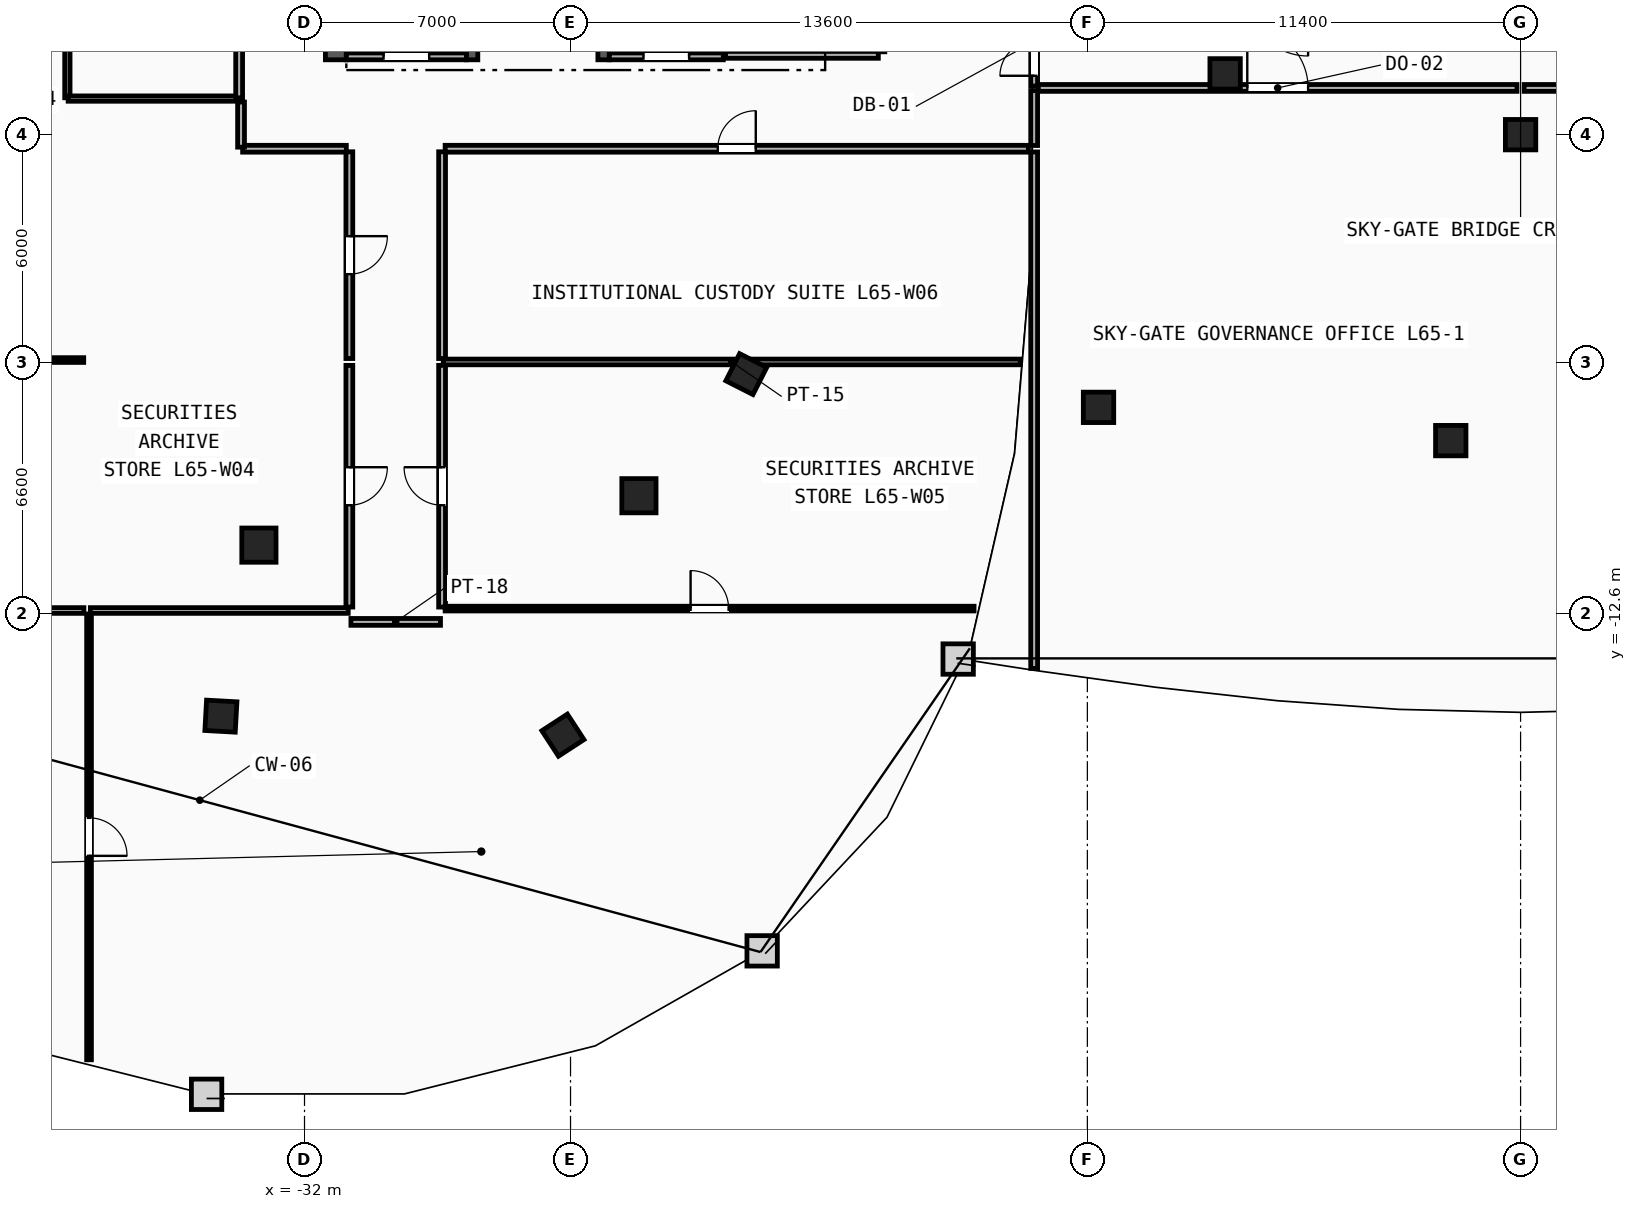
"""IFC4 building model, lengths in metres.
Left out: names, types, materials, properties, quantities, classifications, styles, units other than length and angle.
Written with IfcOpenShell. Run it as: python <this file> out.ifc"""

import sys

from ifc_helpers import new_model, si_unit, direction, frame, frame_2d, origin, origin_2d, place, context, subcontext, project, spatial, rectangle, extrude, element, fill, save


model = new_model("IFC4")
c1 = context("Model", 3, precision=1e-05, world=origin(), true_north=direction((0.0, 1.0)))
c2 = subcontext(c1, "Body", "Model", "MODEL_VIEW")
j1 = project(units=[si_unit("LENGTHUNIT", "METRE"), si_unit("PLANEANGLEUNIT", "RADIAN")], contexts=[c1])
p1 = place(None, origin())
s1 = spatial("IfcSite", under=j1, at=p1, CompositionType="ELEMENT")
p2 = place(p1, origin())
s2 = spatial("IfcBuilding", under=s1, at=p2, CompositionType="ELEMENT")
p3 = place(p2, frame((0.0, 0.0, 246.8)))
s3 = spatial("IfcBuildingStorey", under=s2, at=p3, CompositionType="ELEMENT", Elevation=246.8)
for number, where, z_axis, x_axis in (
    (1, (-33.2, -10.8, 0.0), (0.0, 0.0, 1.0), (1.0, 0.0, 0.0)),
    (2, (-23.2, -9.5, 0.0), (0.0, 0.0, 1.0), (1.0, 0.0, 0.0)),
):
    element("IfcColumn", number, at=place(p3, frame(where, z_axis=z_axis, x_axis=x_axis)), inside=s3, PredefinedType="COLUMN", context=c2, shape_type="SweptSolid", body=[
        extrude(rectangle(XDim=0.9, YDim=0.9, at=origin_2d()), origin(), (0.0, 0.0, 1.0), 3.6),
    ])
for number, where, z_axis, x_axis in (
    (3, (-34.2, -15.3, 0.0), (0.0, 0.0, 1.0), (0.998, -0.055, 0.0)),
    (4, (-25.2, -15.8, 0.0), (0.0, 0.0, 1.0), (0.838, 0.546, 0.0)),
    (5, (-20.375, -6.3, 0.0), (0.0, 0.0, 1.0), (0.453, 0.892, 0.0)),
    (6, (-11.106, -7.175, 0.0), (0.0, 0.0, 1.0), (1.0, 0.0, 0.0)),
    (7, (-1.837, -8.05, 0.0), (0.0, 0.0, 1.0), (1.0, 0.0, 0.0)),
    (8, (-7.775, 1.6, 0.0), (0.0, 0.0, 1.0), (1.0, 0.0, 0.0)),
    (9, (0.0, 0.0, 0.0), (0.0, 0.0, 1.0), (1.0, 0.0, 0.0)),
):
    element("IfcColumn", number, at=place(p3, frame(where, z_axis=z_axis, x_axis=x_axis)), inside=s3, PredefinedType="COLUMN", context=c2, shape_type="SweptSolid", body=[
        extrude(rectangle(XDim=0.8, YDim=0.8, at=origin_2d()), origin(), (0.0, 0.0, 1.0), 3.6),
    ])
p4 = place(p3, frame((-31.175, 1.97, 0.0), z_axis=(0.0, 0.0, 1.0), x_axis=(0.0, 1.0, 0.0)))
e10 = element("IfcWall", 10, at=p4, inside=s3, PredefinedType="SHEAR", context=c2, shape_type="SweptSolid", body=[
    extrude(rectangle(XDim=13.33, YDim=0.55, at=frame_2d((6.665, 0.0))), origin(), (0.0, 0.0, 1.0), 3.34),
])
for number, where, z_axis, x_axis in (
    (11, (-27.59, 1.97, 0.0), (0.0, 0.0, 1.0), (0.0, 1.0, 0.0)),
    (12, (-24.13, 1.97, 0.0), (0.0, 0.0, 1.0), (0.0, 1.0, 0.0)),
):
    element("IfcWall", number, at=place(p3, frame(where, z_axis=z_axis, x_axis=x_axis)), inside=s3, PredefinedType="SHEAR", context=c2, shape_type="SweptSolid", body=[
        extrude(rectangle(XDim=10.68, YDim=0.3, at=frame_2d((5.34, 0.0))), origin(), (0.0, 0.0, 1.0), 3.34),
    ])
p5 = place(p3, frame((-20.89, 2.15, 0.0), z_axis=(0.0, 0.0, 1.0), x_axis=(0.0, 1.0, 0.0)))
e13 = element("IfcWall", 13, at=p5, inside=s3, PredefinedType="PARTITIONING", context=c2, shape_type="SweptSolid", body=[
    extrude(rectangle(XDim=5.3, YDim=0.18, at=frame_2d((2.65, 0.0))), origin(), (0.0, 0.0, 1.0), 3.34),
])
p6 = place(p3, frame((-23.98, 2.06, 0.0), z_axis=(0.0, 0.0, 1.0), x_axis=(1.0, 0.0, 0.0)))
e14 = element("IfcWall", 14, at=p6, inside=s3, PredefinedType="PARTITIONING", context=c2, shape_type="SweptSolid", body=[
    extrude(rectangle(XDim=3.0, YDim=0.18, at=frame_2d((1.5, 0.0))), origin(), (0.0, 0.0, 1.0), 3.34),
])
p7 = place(p6, frame((0.9, 0.0, 0.0)))
e15 = element("IfcOpeningElement", 15, at=p7, cuts=e14, PredefinedType="OPENING", context=c2, shape_type="SweptSolid", body=[
    extrude(rectangle(XDim=1.2, YDim=2.15, at=frame_2d((0.6, 1.075))), frame((0.0, 0.1, 0.0), z_axis=(0.0, -1.0, 0.0), x_axis=(1.0, 0.0, 0.0)), (0.0, 0.0, 1.0), 0.2),
])
p8 = place(p3, frame((-30.9, 2.06, 0.0), z_axis=(0.0, 0.0, 1.0), x_axis=(1.0, 0.0, 0.0)))
e16 = element("IfcWall", 16, at=p8, inside=s3, PredefinedType="PARTITIONING", context=c2, shape_type="SweptSolid", body=[
    extrude(rectangle(XDim=3.16, YDim=0.18, at=frame_2d((1.58, 0.0))), origin(), (0.0, 0.0, 1.0), 3.34),
])
p9 = place(p8, frame((0.98, 0.0, 0.0)))
e17 = element("IfcOpeningElement", 17, at=p9, cuts=e16, PredefinedType="OPENING", context=c2, shape_type="SweptSolid", body=[
    extrude(rectangle(XDim=1.2, YDim=2.15, at=frame_2d((0.6, 1.075))), frame((0.0, 0.1, 0.0), z_axis=(0.0, -1.0, 0.0), x_axis=(1.0, 0.0, 0.0)), (0.0, 0.0, 1.0), 0.2),
])
p10 = place(p3, frame((-38.24, 0.97, 0.0), z_axis=(0.0, 0.0, 1.0), x_axis=(0.0, 1.0, 0.0)))
e18 = element("IfcWall", 18, at=p10, inside=s3, PredefinedType="PARTITIONING", context=c2, shape_type="SweptSolid", body=[
    extrude(rectangle(XDim=4.275, YDim=0.14, at=frame_2d((2.138, 0.0))), origin(), (0.0, 0.0, 1.0), 3.34),
])
p11 = place(p3, frame((-38.22, 0.95, 0.0), z_axis=(0.0, 0.0, 1.0), x_axis=(1.0, 0.0, 0.0)))
e19 = element("IfcWall", 19, at=p11, inside=s3, PredefinedType="PARTITIONING", context=c2, shape_type="SweptSolid", body=[
    extrude(rectangle(XDim=4.48, YDim=0.14, at=frame_2d((2.24, 0.0))), origin(), (0.0, 0.0, 1.0), 3.34),
])
p12 = place(p3, frame((-33.72, 0.97, 0.0), z_axis=(0.0, 0.0, 1.0), x_axis=(0.0, 1.0, 0.0)))
e20 = element("IfcWall", 20, at=p12, inside=s3, PredefinedType="PARTITIONING", context=c2, shape_type="SweptSolid", body=[
    extrude(rectangle(XDim=4.26, YDim=0.18, at=frame_2d((2.13, 0.0))), origin(), (0.0, 0.0, 1.0), 3.34),
])
p13 = place(p12, frame((1.655, 0.0, 0.0)))
e21 = element("IfcOpeningElement", 21, at=p13, cuts=e20, PredefinedType="OPENING", context=c2, shape_type="SweptSolid", body=[
    extrude(rectangle(XDim=0.95, YDim=2.1, at=frame_2d((0.475, 1.05))), frame((0.0, 0.1, 0.0), z_axis=(0.0, -1.0, 0.0), x_axis=(1.0, 0.0, 0.0)), (0.0, 0.0, 1.0), 0.2),
])
p14 = place(p3, frame((-28.35, -5.98, 0.0), z_axis=(0.0, 0.0, 1.0), x_axis=(1.0, 0.0, 0.0)))
e22 = element("IfcWall", 22, at=p14, inside=s3, PredefinedType="PARTITIONING", context=c2, shape_type="SweptSolid", body=[
    extrude(rectangle(XDim=15.185, YDim=0.15, at=frame_2d((7.593, 0.0))), origin(), (0.0, 0.0, 1.0), 3.34),
])
p15 = place(p3, frame((-49.686, -12.52, 0.0), z_axis=(0.0, 0.0, 1.0), x_axis=(1.0, 0.0, 0.0)))
e23 = element("IfcWall", 23, at=p15, inside=s3, PredefinedType="PARTITIONING", context=c2, shape_type="SweptSolid", body=[
    extrude(rectangle(XDim=11.881, YDim=0.15, at=frame_2d((5.94, 0.0))), origin(), (0.0, 0.0, 1.0), 3.34),
])
p16 = place(p3, frame((-37.635, -12.52, 0.0), z_axis=(0.0, 0.0, 1.0), x_axis=(1.0, 0.0, 0.0)))
e24 = element("IfcWall", 24, at=p16, inside=s3, PredefinedType="PARTITIONING", context=c2, shape_type="SweptSolid", body=[
    extrude(rectangle(XDim=6.785, YDim=0.15, at=frame_2d((3.393, 0.0))), origin(), (0.0, 0.0, 1.0), 3.34),
])
p17 = place(p3, frame((-30.779, -12.82, 0.0), z_axis=(0.0, 0.0, 1.0), x_axis=(1.0, 0.0, 0.0)))
e25 = element("IfcWall", 25, at=p17, inside=s3, PredefinedType="PARTITIONING", context=c2, shape_type="SweptSolid", body=[
    extrude(rectangle(XDim=2.357, YDim=0.18, at=frame_2d((1.179, 0.0))), origin(), (0.0, 0.0, 1.0), 3.34),
])
p18 = place(p3, frame((-30.82, -6.07, 0.0), z_axis=(0.0, 0.0, 1.0), x_axis=(0.0, -1.0, 0.0)))
e26 = element("IfcWall", 26, at=p18, inside=s3, PredefinedType="PARTITIONING", context=c2, shape_type="SweptSolid", body=[
    extrude(rectangle(XDim=6.36, YDim=0.18, at=frame_2d((3.18, 0.0))), origin(), (0.0, 0.0, 1.0), 3.34),
])
p19 = place(p18, frame((2.68, 0.0, 0.0)))
e27 = element("IfcOpeningElement", 27, at=p19, cuts=e26, PredefinedType="OPENING", context=c2, shape_type="SweptSolid", body=[
    extrude(rectangle(XDim=1.0, YDim=2.15, at=frame_2d((0.5, 1.075))), frame((0.0, 0.1, 0.0), z_axis=(0.0, -1.0, 0.0), x_axis=(1.0, 0.0, 0.0)), (0.0, 0.0, 1.0), 0.2),
])
p20 = place(p3, frame((-28.38, -12.43, 0.0), z_axis=(0.0, 0.0, 1.0), x_axis=(0.0, 1.0, 0.0)))
e28 = element("IfcWall", 28, at=p20, inside=s3, PredefinedType="PARTITIONING", context=c2, shape_type="SweptSolid", body=[
    extrude(rectangle(XDim=6.36, YDim=0.18, at=frame_2d((3.18, 0.0))), origin(), (0.0, 0.0, 1.0), 3.34),
])
p21 = place(p20, frame((2.68, 0.0, 0.0)))
e29 = element("IfcOpeningElement", 29, at=p21, cuts=e28, PredefinedType="OPENING", context=c2, shape_type="SweptSolid", body=[
    extrude(rectangle(XDim=1.0, YDim=2.15, at=frame_2d((0.5, 1.075))), frame((0.0, 0.1, 0.0), z_axis=(0.0, -1.0, 0.0), x_axis=(1.0, 0.0, 0.0)), (0.0, 0.0, 1.0), 0.2),
])
p22 = place(p3, frame((-28.3, -0.37, 0.0), z_axis=(0.0, 0.0, 1.0), x_axis=(1.0, 0.0, 0.0)))
e30 = element("IfcWall", 30, at=p22, inside=s3, PredefinedType="PARTITIONING", context=c2, shape_type="SweptSolid", body=[
    extrude(rectangle(XDim=15.349, YDim=0.18, at=frame_2d((7.675, 0.0))), origin(), (0.0, 0.0, 1.0), 3.34),
])
p23 = place(p22, frame((7.175, 0.0, 0.0)))
e31 = element("IfcOpeningElement", 31, at=p23, cuts=e30, PredefinedType="OPENING", context=c2, shape_type="SweptSolid", body=[
    extrude(rectangle(XDim=1.0, YDim=2.15, at=frame_2d((0.5, 1.075))), frame((0.0, 0.1, 0.0), z_axis=(0.0, -1.0, 0.0), x_axis=(1.0, 0.0, 0.0)), (0.0, 0.0, 1.0), 0.2),
])
p24 = place(p3, frame((-28.38, -5.89, 0.0), z_axis=(0.0, 0.0, 1.0), x_axis=(0.0, 1.0, 0.0)))
e32 = element("IfcWall", 32, at=p24, inside=s3, PredefinedType="PARTITIONING", context=c2, shape_type="SweptSolid", body=[
    extrude(rectangle(XDim=5.44, YDim=0.18, at=frame_2d((2.72, 0.0))), origin(), (0.0, 0.0, 1.0), 3.34),
])
p25 = place(p3, frame((-30.82, -0.45, 0.0), z_axis=(0.0, 0.0, 1.0), x_axis=(0.0, -1.0, 0.0)))
e33 = element("IfcWall", 33, at=p25, inside=s3, PredefinedType="PARTITIONING", context=c2, shape_type="SweptSolid", body=[
    extrude(rectangle(XDim=5.44, YDim=0.18, at=frame_2d((2.72, 0.0))), origin(), (0.0, 0.0, 1.0), 3.34),
])
p26 = place(p25, frame((2.22, 0.0, 0.0)))
e34 = element("IfcOpeningElement", 34, at=p26, cuts=e33, PredefinedType="OPENING", context=c2, shape_type="SweptSolid", body=[
    extrude(rectangle(XDim=1.0, YDim=2.15, at=frame_2d((0.5, 1.075))), frame((0.0, 0.1, 0.0), z_axis=(0.0, -1.0, 0.0), x_axis=(1.0, 0.0, 0.0)), (0.0, 0.0, 1.0), 0.2),
])
p27 = place(p3, frame((-33.628, -0.37, 0.0), z_axis=(0.0, 0.0, 1.0), x_axis=(1.0, 0.0, 0.0)))
e35 = element("IfcWall", 35, at=p27, inside=s3, PredefinedType="PARTITIONING", context=c2, shape_type="SweptSolid", body=[
    extrude(rectangle(XDim=2.729, YDim=0.18, at=frame_2d((1.364, 0.0))), origin(), (0.0, 0.0, 1.0), 3.34),
])
p28 = place(p3, frame((-33.67, 0.859, 0.0), z_axis=(0.0, 0.0, 1.0), x_axis=(0.0, -1.0, 0.0)))
e36 = element("IfcWall", 36, at=p28, inside=s3, PredefinedType="PARTITIONING", context=c2, shape_type="SweptSolid", body=[
    extrude(rectangle(XDim=1.187, YDim=0.18, at=frame_2d((0.594, 0.0))), origin(), (0.0, 0.0, 1.0), 3.34),
])
p29 = place(p3, frame((-16.9, 2.1, 0.0), z_axis=(0.0, 0.0, 1.0), x_axis=(-1.0, 0.0, 0.0)))
e37 = element("IfcWall", 37, at=p29, inside=s3, PredefinedType="PARTITIONING", context=c2, shape_type="SweptSolid", body=[
    extrude(rectangle(XDim=4.02, YDim=0.18, at=frame_2d((2.01, 0.0))), origin(), (0.0, 0.0, 1.0), 3.34),
])
p30 = place(p3, frame((-28.3, -12.47, 0.0), z_axis=(0.0, 0.0, 1.0), x_axis=(1.0, 0.0, 0.0)))
e38 = element("IfcWall", 38, at=p30, inside=s3, PredefinedType="PARTITIONING", context=c2, shape_type="SweptSolid", body=[
    extrude(rectangle(XDim=13.919, YDim=0.125, at=frame_2d((6.959, 0.0))), origin(), (0.0, 0.0, 1.0), 3.34),
])
p31 = place(p30, frame((6.459, 0.0, 0.0)))
e39 = element("IfcOpeningElement", 39, at=p31, cuts=e38, PredefinedType="OPENING", context=c2, shape_type="SweptSolid", body=[
    extrude(rectangle(XDim=1.0, YDim=2.15, at=frame_2d((0.5, 1.075))), frame((0.0, 0.073, 0.0), z_axis=(0.0, -1.0, 0.0), x_axis=(1.0, 0.0, 0.0)), (0.0, 0.0, 1.0), 0.145),
])
p32 = place(p3, frame((-37.67, -12.61, 0.0), z_axis=(0.0, 0.0, 1.0), x_axis=(0.0, -1.0, 0.0)))
e40 = element("IfcWall", 40, at=p32, inside=s3, PredefinedType="PARTITIONING", context=c2, shape_type="SweptSolid", body=[
    extrude(rectangle(XDim=11.731, YDim=0.125, at=frame_2d((5.866, 0.0))), origin(), (0.0, 0.0, 1.0), 3.34),
])
p33 = place(p32, frame((5.366, 0.0, 0.0)))
e41 = element("IfcOpeningElement", 41, at=p33, cuts=e40, PredefinedType="OPENING", context=c2, shape_type="SweptSolid", body=[
    extrude(rectangle(XDim=1.0, YDim=2.15, at=frame_2d((0.5, 1.075))), frame((0.0, 0.073, 0.0), z_axis=(0.0, -1.0, 0.0), x_axis=(1.0, 0.0, 0.0)), (0.0, 0.0, 1.0), 0.145),
])
p34 = place(p3, frame((-50.779, -5.93, 0.0), z_axis=(0.0, 0.0, 1.0), x_axis=(1.0, 0.0, 0.0)))
e42 = element("IfcWall", 42, at=p34, inside=s3, PredefinedType="PARTITIONING", context=c2, shape_type="SweptSolid", body=[
    extrude(rectangle(XDim=12.969, YDim=0.125, at=frame_2d((6.485, 0.0))), origin(), (0.0, 0.0, 1.0), 3.34),
])
p35 = place(p34, frame((5.985, 0.0, 0.0)))
e43 = element("IfcOpeningElement", 43, at=p35, cuts=e42, PredefinedType="OPENING", context=c2, shape_type="SweptSolid", body=[
    extrude(rectangle(XDim=1.0, YDim=2.15, at=frame_2d((0.5, 1.075))), frame((0.0, 0.073, 0.0), z_axis=(0.0, -1.0, 0.0), x_axis=(1.0, 0.0, 0.0)), (0.0, 0.0, 1.0), 0.145),
])
p36 = place(p3, frame((-12.688, 1.23, 0.0), z_axis=(0.0, 0.0, 1.0), x_axis=(1.0, 0.0, 0.0)))
e44 = element("IfcWall", 44, at=p36, inside=s3, PredefinedType="PARTITIONING", context=c2, shape_type="SweptSolid", body=[
    extrude(rectangle(XDim=12.594, YDim=0.18, at=frame_2d((6.297, 0.0))), origin(), (0.0, 0.0, 1.0), 2.663),
])
p37 = place(p36, frame((5.497, 0.0, 0.0)))
e45 = element("IfcOpeningElement", 45, at=p37, cuts=e44, PredefinedType="OPENING", context=c2, shape_type="SweptSolid", body=[
    extrude(rectangle(XDim=1.6, YDim=2.2, at=frame_2d((0.8, 1.1))), frame((0.0, 0.1, 0.0), z_axis=(0.0, -1.0, 0.0), x_axis=(1.0, 0.0, 0.0)), (0.0, 0.0, 1.0), 0.2),
])
p38 = place(p3, frame((0.095, 1.23, 0.0), z_axis=(0.0, 0.0, 1.0), x_axis=(1.0, 0.0, 0.0)))
e46 = element("IfcWall", 46, at=p38, inside=s3, PredefinedType="PARTITIONING", context=c2, shape_type="SweptSolid", body=[
    extrude(rectangle(XDim=12.594, YDim=0.18, at=frame_2d((6.297, 0.0))), origin(), (0.0, 0.0, 1.0), 3.34),
])
p39 = place(p38, frame((5.497, 0.0, 0.0)))
e47 = element("IfcOpeningElement", 47, at=p39, cuts=e46, PredefinedType="OPENING", context=c2, shape_type="SweptSolid", body=[
    extrude(rectangle(XDim=1.6, YDim=2.2, at=frame_2d((0.8, 1.1))), frame((0.0, 0.1, 0.0), z_axis=(0.0, -1.0, 0.0), x_axis=(1.0, 0.0, 0.0)), (0.0, 0.0, 1.0), 0.2),
])
p40 = place(p3, frame((-12.8, -14.044, 0.0), z_axis=(0.0, 0.0, 1.0), x_axis=(0.0, 1.0, 0.0)))
e48 = element("IfcWall", 48, at=p40, inside=s3, PredefinedType="PARTITIONING", context=c2, shape_type="SweptSolid", body=[
    extrude(rectangle(XDim=13.589, YDim=0.18, at=frame_2d((6.794, 0.0))), origin(), (0.0, 0.0, 1.0), 3.34),
])
p41 = place(p3, frame((-12.8, -0.285, 0.0), z_axis=(0.0, 0.0, 1.0), x_axis=(0.0, 1.0, 0.0)))
e49 = element("IfcWall", 49, at=p41, inside=s3, PredefinedType="PARTITIONING", context=c2, shape_type="SweptSolid", body=[
    extrude(rectangle(XDim=1.445, YDim=0.18, at=frame_2d((0.722, 0.0))), origin(), (0.0, 0.0, 1.0), 3.34),
])
p42 = place(p3, frame((-12.8, 1.28, 0.0), z_axis=(0.0, 0.0, 1.0), x_axis=(0.0, 1.0, 0.0)))
e50 = element("IfcWall", 50, at=p42, inside=s3, PredefinedType="PARTITIONING", context=c2, shape_type="SweptSolid", body=[
    extrude(rectangle(XDim=2.34, YDim=0.18, at=frame_2d((1.17, 0.0))), origin(), (0.0, 0.0, 1.0), 3.34),
])
p43 = place(p42, frame((0.27, 0.0, 0.0)))
e51 = element("IfcOpeningElement", 51, at=p43, cuts=e50, PredefinedType="OPENING", context=c2, shape_type="SweptSolid", body=[
    extrude(rectangle(XDim=1.8, YDim=2.25, at=frame_2d((0.9, 1.125))), frame((0.0, 0.1, 0.0), z_axis=(0.0, -1.0, 0.0), x_axis=(1.0, 0.0, 0.0)), (0.0, 0.0, 1.0), 0.2),
])
p44 = place(p7, origin())
e52 = element("IfcDoor", 52, at=p44, inside=s3, OperationType="SINGLE_SWING_RIGHT", PredefinedType="DOOR", context=c2, shape_type="SweptSolid", body=[
    extrude(rectangle(XDim=1.2, YDim=2.15, at=frame_2d((0.6, 1.075))), frame((0.0, 0.025, 0.0), z_axis=(0.0, -1.0, 0.0), x_axis=(1.0, 0.0, 0.0)), (0.0, 0.0, 1.0), 0.05),
])
fill(e15, e52)
p45 = place(p9, origin())
e53 = element("IfcDoor", 53, at=p45, inside=s3, OperationType="SINGLE_SWING_LEFT", PredefinedType="DOOR", context=c2, shape_type="SweptSolid", body=[
    extrude(rectangle(XDim=1.2, YDim=2.15, at=frame_2d((0.6, 1.075))), frame((0.0, 0.025, 0.0), z_axis=(0.0, -1.0, 0.0), x_axis=(1.0, 0.0, 0.0)), (0.0, 0.0, 1.0), 0.05),
])
fill(e17, e53)
p46 = place(p23, origin())
e54 = element("IfcDoor", 54, at=p46, inside=s3, OperationType="SINGLE_SWING_RIGHT", PredefinedType="DOOR", context=c2, shape_type="SweptSolid", body=[
    extrude(rectangle(XDim=1.0, YDim=2.15, at=frame_2d((0.5, 1.075))), frame((0.0, 0.025, 0.0), z_axis=(0.0, -1.0, 0.0), x_axis=(1.0, 0.0, 0.0)), (0.0, 0.0, 1.0), 0.05),
])
fill(e31, e54)
p47 = place(p31, origin())
e55 = element("IfcDoor", 55, at=p47, inside=s3, OperationType="SINGLE_SWING_LEFT", PredefinedType="DOOR", context=c2, shape_type="SweptSolid", body=[
    extrude(rectangle(XDim=1.0, YDim=2.15, at=frame_2d((0.5, 1.075))), frame((0.0, 0.025, 0.0), z_axis=(0.0, -1.0, 0.0), x_axis=(1.0, 0.0, 0.0)), (0.0, 0.0, 1.0), 0.05),
])
fill(e39, e55)
p48 = place(p37, origin())
e56 = element("IfcDoor", 56, at=p48, inside=s3, OperationType="SINGLE_SWING_LEFT", PredefinedType="DOOR", context=c2, shape_type="SweptSolid", body=[
    extrude(rectangle(XDim=1.6, YDim=2.2, at=frame_2d((0.8, 1.1))), frame((0.0, 0.025, 0.0), z_axis=(0.0, -1.0, 0.0), x_axis=(1.0, 0.0, 0.0)), (0.0, 0.0, 1.0), 0.05),
])
fill(e45, e56)
p49 = place(p33, origin())
e57 = element("IfcDoor", 57, at=p49, inside=s3, OperationType="SINGLE_SWING_RIGHT", PredefinedType="DOOR", context=c2, shape_type="SweptSolid", body=[
    extrude(rectangle(XDim=1.0, YDim=2.15, at=frame_2d((0.5, 1.075))), frame((0.0, 0.025, 0.0), z_axis=(0.0, -1.0, 0.0), x_axis=(1.0, 0.0, 0.0)), (0.0, 0.0, 1.0), 0.05),
])
fill(e41, e57)
p50 = place(p19, origin())
e58 = element("IfcDoor", 58, at=p50, inside=s3, OperationType="SINGLE_SWING_LEFT", PredefinedType="DOOR", context=c2, shape_type="SweptSolid", body=[
    extrude(rectangle(XDim=1.0, YDim=2.15, at=frame_2d((0.5, 1.075))), frame((0.0, 0.025, 0.0), z_axis=(0.0, -1.0, 0.0), x_axis=(1.0, 0.0, 0.0)), (0.0, 0.0, 1.0), 0.05),
])
fill(e27, e58)
p51 = place(p21, origin())
e59 = element("IfcDoor", 59, at=p51, inside=s3, OperationType="SINGLE_SWING_RIGHT", PredefinedType="DOOR", context=c2, shape_type="SweptSolid", body=[
    extrude(rectangle(XDim=1.0, YDim=2.15, at=frame_2d((0.5, 1.075))), frame((0.0, 0.025, 0.0), z_axis=(0.0, -1.0, 0.0), x_axis=(1.0, 0.0, 0.0)), (0.0, 0.0, 1.0), 0.05),
])
fill(e29, e59)
p52 = place(p26, origin())
e60 = element("IfcDoor", 60, at=p52, inside=s3, OperationType="SINGLE_SWING_LEFT", PredefinedType="DOOR", context=c2, shape_type="SweptSolid", body=[
    extrude(rectangle(XDim=1.0, YDim=2.15, at=frame_2d((0.5, 1.075))), frame((0.0, 0.025, 0.0), z_axis=(0.0, -1.0, 0.0), x_axis=(1.0, 0.0, 0.0)), (0.0, 0.0, 1.0), 0.05),
])
fill(e34, e60)
p53 = place(p43, origin())
e61 = element("IfcDoor", 61, at=p53, inside=s3, OperationType="DOUBLE_DOOR_SINGLE_SWING", PredefinedType="DOOR", context=c2, shape_type="SweptSolid", body=[
    extrude(rectangle(XDim=1.8, YDim=2.25, at=frame_2d((0.9, 1.125))), frame((0.0, 0.025, 0.0), z_axis=(0.0, -1.0, 0.0), x_axis=(1.0, 0.0, 0.0)), (0.0, 0.0, 1.0), 0.05),
])
fill(e51, e61)
save(model, sys.argv[1])
